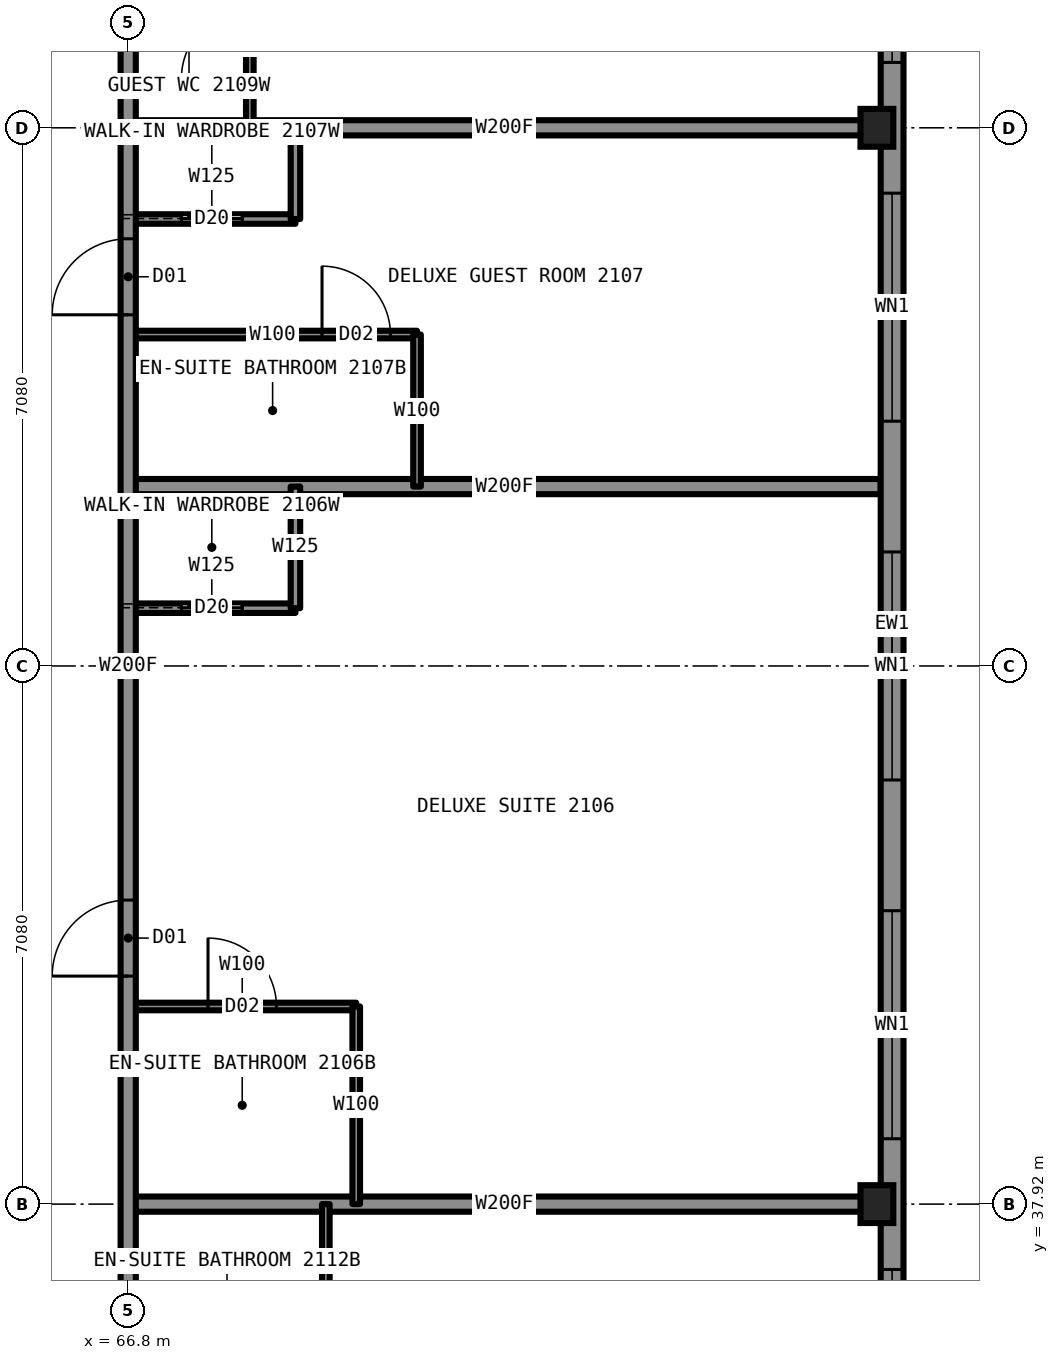
"""IFC4 building model, lengths in metres.
Left out: names, types, materials, properties, quantities, classifications, styles, units other than length and angle.
Written with IfcOpenShell. Run it as: python <this file> out.ifc"""

import sys

from ifc_helpers import new_model, si_unit, direction, frame, frame_2d, origin, origin_2d, place, context, subcontext, project, spatial, rectangle, i_section, extrude, element, fill, save


model = new_model("IFC4")
c1 = context("Model", 3, precision=1e-05, world=origin(), true_north=direction((0.0, 1.0)))
c2 = subcontext(c1, "Body", "Model", "MODEL_VIEW")
j1 = project(units=[si_unit("LENGTHUNIT", "METRE"), si_unit("PLANEANGLEUNIT", "RADIAN")], contexts=[c1])
p1 = place(None, origin())
s1 = spatial("IfcSite", under=j1, at=p1, CompositionType="ELEMENT")
p2 = place(p1, origin())
s2 = spatial("IfcBuilding", under=s1, at=p2, CompositionType="ELEMENT")
p3 = place(p2, frame((0.0, 0.0, 81.0)))
s3 = spatial("IfcBuildingStorey", under=s2, at=p3, CompositionType="ELEMENT", Elevation=81.0)
for number, where, z_axis, x_axis in (
    (1, (76.65, 37.92, 0.0), (0.0, 0.0, 1.0), (1.0, 0.0, 0.0)),
    (2, (76.65, 52.08, 0.0), (0.0, 0.0, 1.0), (1.0, 0.0, 0.0)),
):
    element("IfcColumn", number, at=place(p3, frame(where, z_axis=z_axis, x_axis=x_axis)), inside=s3, PredefinedType="COLUMN", context=c2, shape_type="SweptSolid", body=[
        extrude(i_section(OverallWidth=0.432, OverallDepth=0.498, WebThickness=0.056, FlangeThickness=0.089, at=origin_2d()), origin(), (0.0, 0.0, 1.0), 3.5),
    ])
p4 = place(p3, frame((66.8, 40.52, 0.0), z_axis=(0.0, 0.0, 1.0), x_axis=(1.0, 0.0, 0.0)))
e3 = element("IfcWall", 3, at=p4, inside=s3, PredefinedType="PARTITIONING", context=c2, shape_type="SweptSolid", body=[
    extrude(rectangle(XDim=3.0, YDim=0.1, at=frame_2d((1.5, 0.0))), origin(), (0.0, 0.0, 1.0), 3.33),
])
p5 = place(p4, frame((1.05, 0.0, 0.0)))
e4 = element("IfcOpeningElement", 4, at=p5, cuts=e3, PredefinedType="OPENING", context=c2, shape_type="SweptSolid", body=[
    extrude(rectangle(XDim=0.9, YDim=2.1, at=frame_2d((0.45, 1.05))), frame((0.0, 0.06, 0.0), z_axis=(0.0, -1.0, 0.0), x_axis=(1.0, 0.0, 0.0)), (0.0, 0.0, 1.0), 0.12),
])
p6 = place(p3, frame((66.8, 37.92, 0.0), z_axis=(0.0, 0.0, 1.0), x_axis=(1.0, 0.0, 0.0)))
e5 = element("IfcWall", 5, at=p6, inside=s3, PredefinedType="PARTITIONING", context=c2, shape_type="SweptSolid", body=[
    extrude(rectangle(XDim=9.9, YDim=0.2, at=frame_2d((4.95, 0.0))), origin(), (0.0, 0.0, 1.0), 2.573),
])
p7 = place(p3, frame((66.8, 45.76, 0.0), z_axis=(0.0, 0.0, 1.0), x_axis=(1.0, 0.0, 0.0)))
e6 = element("IfcWall", 6, at=p7, inside=s3, PredefinedType="PARTITIONING", context=c2, shape_type="SweptSolid", body=[
    extrude(rectangle(XDim=2.2, YDim=0.125, at=frame_2d((1.1, 0.0))), origin(), (0.0, 0.0, 1.0), 3.33),
])
p8 = place(p7, frame((0.7, 0.0, 0.0)))
e7 = element("IfcOpeningElement", 7, at=p8, cuts=e6, PredefinedType="OPENING", context=c2, shape_type="SweptSolid", body=[
    extrude(rectangle(XDim=0.8, YDim=2.1, at=frame_2d((0.4, 1.05))), frame((0.0, 0.073, 0.0), z_axis=(0.0, -1.0, 0.0), x_axis=(1.0, 0.0, 0.0)), (0.0, 0.0, 1.0), 0.145),
])
p9 = place(p3, frame((66.8, 47.36, 0.0), z_axis=(0.0, 0.0, 1.0), x_axis=(1.0, 0.0, 0.0)))
e8 = element("IfcWall", 8, at=p9, inside=s3, PredefinedType="PARTITIONING", context=c2, shape_type="SweptSolid", body=[
    extrude(rectangle(XDim=9.9, YDim=0.2, at=frame_2d((4.95, 0.0))), origin(), (0.0, 0.0, 1.0), 2.723),
])
p10 = place(p3, frame((66.8, 49.36, 0.0), z_axis=(0.0, 0.0, 1.0), x_axis=(1.0, 0.0, 0.0)))
e9 = element("IfcWall", 9, at=p10, inside=s3, PredefinedType="PARTITIONING", context=c2, shape_type="SweptSolid", body=[
    extrude(rectangle(XDim=3.8, YDim=0.1, at=frame_2d((1.9, 0.0))), origin(), (0.0, 0.0, 1.0), 3.33),
])
p11 = place(p10, frame((2.55, 0.0, 0.0)))
e10 = element("IfcOpeningElement", 10, at=p11, cuts=e9, PredefinedType="OPENING", context=c2, shape_type="SweptSolid", body=[
    extrude(rectangle(XDim=0.9, YDim=2.1, at=frame_2d((0.45, 1.05))), frame((0.0, 0.06, 0.0), z_axis=(0.0, -1.0, 0.0), x_axis=(1.0, 0.0, 0.0)), (0.0, 0.0, 1.0), 0.12),
])
p12 = place(p3, frame((66.8, 50.88, 0.0), z_axis=(0.0, 0.0, 1.0), x_axis=(1.0, 0.0, 0.0)))
e11 = element("IfcWall", 11, at=p12, inside=s3, PredefinedType="PARTITIONING", context=c2, shape_type="SweptSolid", body=[
    extrude(rectangle(XDim=2.2, YDim=0.125, at=frame_2d((1.1, 0.0))), origin(), (0.0, 0.0, 1.0), 3.33),
])
p13 = place(p12, frame((0.7, 0.0, 0.0)))
e12 = element("IfcOpeningElement", 12, at=p13, cuts=e11, PredefinedType="OPENING", context=c2, shape_type="SweptSolid", body=[
    extrude(rectangle(XDim=0.8, YDim=2.1, at=frame_2d((0.4, 1.05))), frame((0.0, 0.073, 0.0), z_axis=(0.0, -1.0, 0.0), x_axis=(1.0, 0.0, 0.0)), (0.0, 0.0, 1.0), 0.145),
])
p14 = place(p3, frame((66.8, 52.08, 0.0), z_axis=(0.0, 0.0, 1.0), x_axis=(1.0, 0.0, 0.0)))
e13 = element("IfcWall", 13, at=p14, inside=s3, PredefinedType="PARTITIONING", context=c2, shape_type="SweptSolid", body=[
    extrude(rectangle(XDim=9.9, YDim=0.2, at=frame_2d((4.95, 0.0))), origin(), (0.0, 0.0, 1.0), 2.573),
])
p15 = place(p3, frame((66.8, 33.2, 0.0), z_axis=(0.0, 0.0, 1.0), x_axis=(0.0, 1.0, 0.0)))
e14 = element("IfcWall", 14, at=p15, inside=s3, PredefinedType="PARTITIONING", context=c2, shape_type="SweptSolid", body=[
    extrude(rectangle(XDim=23.6, YDim=0.2, at=frame_2d((11.8, 0.0))), origin(), (0.0, 0.0, 1.0), 3.33),
])
p16 = place(p15, frame((7.72, 0.0, 0.0)))
e15 = element("IfcOpeningElement", 15, at=p16, cuts=e14, PredefinedType="OPENING", context=c2, shape_type="SweptSolid", body=[
    extrude(rectangle(XDim=1.0, YDim=2.2, at=frame_2d((0.5, 1.1))), frame((0.0, 0.11, 0.0), z_axis=(0.0, -1.0, 0.0), x_axis=(1.0, 0.0, 0.0)), (0.0, 0.0, 1.0), 0.22),
])
p17 = place(p15, frame((16.42, 0.0, 0.0)))
e16 = element("IfcOpeningElement", 16, at=p17, cuts=e14, PredefinedType="OPENING", context=c2, shape_type="SweptSolid", body=[
    extrude(rectangle(XDim=1.0, YDim=2.2, at=frame_2d((0.5, 1.1))), frame((0.0, 0.11, 0.0), z_axis=(0.0, -1.0, 0.0), x_axis=(1.0, 0.0, 0.0)), (0.0, 0.0, 1.0), 0.22),
])
p18 = place(p15, frame((21.85, 0.0, 0.0)))
e17 = element("IfcOpeningElement", 17, at=p18, cuts=e14, PredefinedType="OPENING", context=c2, shape_type="SweptSolid", body=[
    extrude(rectangle(XDim=1.1, YDim=2.2, at=frame_2d((0.55, 1.1))), frame((0.0, 0.11, 0.0), z_axis=(0.0, -1.0, 0.0), x_axis=(1.0, 0.0, 0.0)), (0.0, 0.0, 1.0), 0.22),
])
p19 = place(p15, frame((0.66, 0.0, 0.0)))
e18 = element("IfcOpeningElement", 18, at=p19, cuts=e14, PredefinedType="OPENING", context=c2, shape_type="SweptSolid", body=[
    extrude(rectangle(XDim=1.1, YDim=2.2, at=frame_2d((0.55, 1.1))), frame((0.0, 0.11, 0.0), z_axis=(0.0, -1.0, 0.0), x_axis=(1.0, 0.0, 0.0)), (0.0, 0.0, 1.0), 0.22),
])
p20 = place(p3, frame((68.4, 52.08, 0.0), z_axis=(0.0, 0.0, 1.0), x_axis=(0.0, 1.0, 0.0)))
e19 = element("IfcWall", 19, at=p20, inside=s3, PredefinedType="PARTITIONING", context=c2, shape_type="SweptSolid", body=[
    extrude(rectangle(XDim=2.2, YDim=0.1, at=frame_2d((1.1, 0.0))), origin(), (0.0, 0.0, 1.0), 3.33),
])
p21 = place(p20, frame((0.65, 0.0, 0.0)))
e20 = element("IfcOpeningElement", 20, at=p21, cuts=e19, PredefinedType="OPENING", context=c2, shape_type="SweptSolid", body=[
    extrude(rectangle(XDim=0.9, YDim=2.1, at=frame_2d((0.45, 1.05))), frame((0.0, 0.06, 0.0), z_axis=(0.0, -1.0, 0.0), x_axis=(1.0, 0.0, 0.0)), (0.0, 0.0, 1.0), 0.12),
])
p22 = place(p3, frame((69.0, 45.76, 0.0), z_axis=(0.0, 0.0, 1.0), x_axis=(0.0, 1.0, 0.0)))
e21 = element("IfcWall", 21, at=p22, inside=s3, PredefinedType="PARTITIONING", context=c2, shape_type="SweptSolid", body=[
    extrude(rectangle(XDim=1.6, YDim=0.125, at=frame_2d((0.8, 0.0))), origin(), (0.0, 0.0, 1.0), 3.33),
])
p23 = place(p3, frame((69.0, 50.88, 0.0), z_axis=(0.0, 0.0, 1.0), x_axis=(0.0, 1.0, 0.0)))
e22 = element("IfcWall", 22, at=p23, inside=s3, PredefinedType="PARTITIONING", context=c2, shape_type="SweptSolid", body=[
    extrude(rectangle(XDim=1.2, YDim=0.125, at=frame_2d((0.6, 0.0))), origin(), (0.0, 0.0, 1.0), 3.33),
])
p24 = place(p3, frame((69.4, 35.32, 0.0), z_axis=(0.0, 0.0, 1.0), x_axis=(0.0, 1.0, 0.0)))
e23 = element("IfcWall", 23, at=p24, inside=s3, PredefinedType="PARTITIONING", context=c2, shape_type="SweptSolid", body=[
    extrude(rectangle(XDim=2.6, YDim=0.1, at=frame_2d((1.3, 0.0))), origin(), (0.0, 0.0, 1.0), 3.33),
])
p25 = place(p3, frame((69.8, 37.92, 0.0), z_axis=(0.0, 0.0, 1.0), x_axis=(0.0, 1.0, 0.0)))
e24 = element("IfcWall", 24, at=p25, inside=s3, PredefinedType="PARTITIONING", context=c2, shape_type="SweptSolid", body=[
    extrude(rectangle(XDim=2.6, YDim=0.1, at=frame_2d((1.3, 0.0))), origin(), (0.0, 0.0, 1.0), 3.33),
])
p26 = place(p3, frame((70.6, 47.36, 0.0), z_axis=(0.0, 0.0, 1.0), x_axis=(0.0, 1.0, 0.0)))
e25 = element("IfcWall", 25, at=p26, inside=s3, PredefinedType="PARTITIONING", context=c2, shape_type="SweptSolid", body=[
    extrude(rectangle(XDim=2.0, YDim=0.1, at=frame_2d((1.0, 0.0))), origin(), (0.0, 0.0, 1.0), 3.33),
])
p27 = place(p3, frame((76.85, 28.5, 0.0), z_axis=(0.0, 0.0, 1.0), x_axis=(0.0, 1.0, 0.0)))
e26 = element("IfcWall", 26, at=p27, inside=s3, PredefinedType="SOLIDWALL", context=c2, shape_type="SweptSolid", body=[
    extrude(rectangle(XDim=33.0, YDim=0.3, at=frame_2d((16.5, 0.0))), origin(), (0.0, 0.0, 1.0), 2.63),
])
p28 = place(p27, frame((0.85, 0.0, 0.5)))
e27 = element("IfcOpeningElement", 27, at=p28, cuts=e26, PredefinedType="OPENING", context=c2, shape_type="SweptSolid", body=[
    extrude(rectangle(XDim=3.0, YDim=2.0, at=frame_2d((1.5, 1.0))), frame((0.0, 0.16, 0.0), z_axis=(0.0, -1.0, 0.0), x_axis=(1.0, 0.0, 0.0)), (0.0, 0.0, 1.0), 0.32),
])
p29 = place(p27, frame((5.56, 0.0, 0.5)))
e28 = element("IfcOpeningElement", 28, at=p29, cuts=e26, PredefinedType="OPENING", context=c2, shape_type="SweptSolid", body=[
    extrude(rectangle(XDim=3.0, YDim=2.0, at=frame_2d((1.5, 1.0))), frame((0.0, 0.16, 0.0), z_axis=(0.0, -1.0, 0.0), x_axis=(1.0, 0.0, 0.0)), (0.0, 0.0, 1.0), 0.32),
])
p30 = place(p27, frame((10.28, 0.0, 0.5)))
e29 = element("IfcOpeningElement", 29, at=p30, cuts=e26, PredefinedType="OPENING", context=c2, shape_type="SweptSolid", body=[
    extrude(rectangle(XDim=3.0, YDim=2.0, at=frame_2d((1.5, 1.0))), frame((0.0, 0.16, 0.0), z_axis=(0.0, -1.0, 0.0), x_axis=(1.0, 0.0, 0.0)), (0.0, 0.0, 1.0), 0.32),
])
p31 = place(p27, frame((15.0, 0.0, 0.5)))
e30 = element("IfcOpeningElement", 30, at=p31, cuts=e26, PredefinedType="OPENING", context=c2, shape_type="SweptSolid", body=[
    extrude(rectangle(XDim=3.0, YDim=2.0, at=frame_2d((1.5, 1.0))), frame((0.0, 0.16, 0.0), z_axis=(0.0, -1.0, 0.0), x_axis=(1.0, 0.0, 0.0)), (0.0, 0.0, 1.0), 0.32),
])
p32 = place(p27, frame((19.72, 0.0, 0.5)))
e31 = element("IfcOpeningElement", 31, at=p32, cuts=e26, PredefinedType="OPENING", context=c2, shape_type="SweptSolid", body=[
    extrude(rectangle(XDim=3.0, YDim=2.0, at=frame_2d((1.5, 1.0))), frame((0.0, 0.16, 0.0), z_axis=(0.0, -1.0, 0.0), x_axis=(1.0, 0.0, 0.0)), (0.0, 0.0, 1.0), 0.32),
])
p33 = place(p27, frame((24.44, 0.0, 0.5)))
e32 = element("IfcOpeningElement", 32, at=p33, cuts=e26, PredefinedType="OPENING", context=c2, shape_type="SweptSolid", body=[
    extrude(rectangle(XDim=3.0, YDim=2.0, at=frame_2d((1.5, 1.0))), frame((0.0, 0.16, 0.0), z_axis=(0.0, -1.0, 0.0), x_axis=(1.0, 0.0, 0.0)), (0.0, 0.0, 1.0), 0.32),
])
p34 = place(p27, frame((29.15, 0.0, 0.5)))
e33 = element("IfcOpeningElement", 33, at=p34, cuts=e26, PredefinedType="OPENING", context=c2, shape_type="SweptSolid", body=[
    extrude(rectangle(XDim=3.0, YDim=2.0, at=frame_2d((1.5, 1.0))), frame((0.0, 0.16, 0.0), z_axis=(0.0, -1.0, 0.0), x_axis=(1.0, 0.0, 0.0)), (0.0, 0.0, 1.0), 0.32),
])
p35 = place(p16, origin())
e34 = element("IfcDoor", 34, at=p35, inside=s3, OperationType="SINGLE_SWING_LEFT", PredefinedType="DOOR", context=c2, shape_type="SweptSolid", body=[
    extrude(rectangle(XDim=1.0, YDim=2.2, at=frame_2d((0.5, 1.1))), frame((0.0, 0.025, 0.0), z_axis=(0.0, -1.0, 0.0), x_axis=(1.0, 0.0, 0.0)), (0.0, 0.0, 1.0), 0.05),
])
fill(e15, e34)
p36 = place(p5, origin())
e35 = element("IfcDoor", 35, at=p36, inside=s3, OperationType="SINGLE_SWING_RIGHT", PredefinedType="DOOR", context=c2, shape_type="SweptSolid", body=[
    extrude(rectangle(XDim=0.9, YDim=2.1, at=frame_2d((0.45, 1.05))), frame((0.0, 0.025, 0.0), z_axis=(0.0, -1.0, 0.0), x_axis=(1.0, 0.0, 0.0)), (0.0, 0.0, 1.0), 0.05),
])
fill(e4, e35)
p37 = place(p8, origin())
e36 = element("IfcDoor", 36, at=p37, inside=s3, OperationType="SLIDING_TO_LEFT", PredefinedType="DOOR", context=c2, shape_type="SweptSolid", body=[
    extrude(rectangle(XDim=0.8, YDim=2.1, at=frame_2d((0.4, 1.05))), frame((0.0, 0.025, 0.0), z_axis=(0.0, -1.0, 0.0), x_axis=(1.0, 0.0, 0.0)), (0.0, 0.0, 1.0), 0.05),
])
fill(e7, e36)
p38 = place(p17, origin())
e37 = element("IfcDoor", 37, at=p38, inside=s3, OperationType="SINGLE_SWING_LEFT", PredefinedType="DOOR", context=c2, shape_type="SweptSolid", body=[
    extrude(rectangle(XDim=1.0, YDim=2.2, at=frame_2d((0.5, 1.1))), frame((0.0, 0.025, 0.0), z_axis=(0.0, -1.0, 0.0), x_axis=(1.0, 0.0, 0.0)), (0.0, 0.0, 1.0), 0.05),
])
fill(e16, e37)
p39 = place(p11, origin())
e38 = element("IfcDoor", 38, at=p39, inside=s3, OperationType="SINGLE_SWING_RIGHT", PredefinedType="DOOR", context=c2, shape_type="SweptSolid", body=[
    extrude(rectangle(XDim=0.9, YDim=2.1, at=frame_2d((0.45, 1.05))), frame((0.0, 0.025, 0.0), z_axis=(0.0, -1.0, 0.0), x_axis=(1.0, 0.0, 0.0)), (0.0, 0.0, 1.0), 0.05),
])
fill(e10, e38)
p40 = place(p13, origin())
e39 = element("IfcDoor", 39, at=p40, inside=s3, OperationType="SLIDING_TO_LEFT", PredefinedType="DOOR", context=c2, shape_type="SweptSolid", body=[
    extrude(rectangle(XDim=0.8, YDim=2.1, at=frame_2d((0.4, 1.05))), frame((0.0, 0.025, 0.0), z_axis=(0.0, -1.0, 0.0), x_axis=(1.0, 0.0, 0.0)), (0.0, 0.0, 1.0), 0.05),
])
fill(e12, e39)
p41 = place(p21, origin())
e40 = element("IfcDoor", 40, at=p41, inside=s3, OperationType="SINGLE_SWING_LEFT", PredefinedType="DOOR", context=c2, shape_type="SweptSolid", body=[
    extrude(rectangle(XDim=0.9, YDim=2.1, at=frame_2d((0.45, 1.05))), frame((0.0, 0.025, 0.0), z_axis=(0.0, -1.0, 0.0), x_axis=(1.0, 0.0, 0.0)), (0.0, 0.0, 1.0), 0.05),
])
fill(e20, e40)
p42 = place(p29, origin())
e41 = element("IfcWindow", 41, at=p42, inside=s3, PartitioningType="SINGLE_PANEL", PredefinedType="WINDOW", context=c2, shape_type="SweptSolid", body=[
    extrude(rectangle(XDim=3.0, YDim=2.0, at=frame_2d((1.5, 1.0))), frame((0.0, 0.03, 0.0), z_axis=(0.0, -1.0, 0.0), x_axis=(1.0, 0.0, 0.0)), (0.0, 0.0, 1.0), 0.06),
])
fill(e28, e41)
p43 = place(p30, origin())
e42 = element("IfcWindow", 42, at=p43, inside=s3, PartitioningType="SINGLE_PANEL", PredefinedType="WINDOW", context=c2, shape_type="SweptSolid", body=[
    extrude(rectangle(XDim=3.0, YDim=2.0, at=frame_2d((1.5, 1.0))), frame((0.0, 0.03, 0.0), z_axis=(0.0, -1.0, 0.0), x_axis=(1.0, 0.0, 0.0)), (0.0, 0.0, 1.0), 0.06),
])
fill(e29, e42)
p44 = place(p31, origin())
e43 = element("IfcWindow", 43, at=p44, inside=s3, PartitioningType="SINGLE_PANEL", PredefinedType="WINDOW", context=c2, shape_type="SweptSolid", body=[
    extrude(rectangle(XDim=3.0, YDim=2.0, at=frame_2d((1.5, 1.0))), frame((0.0, 0.03, 0.0), z_axis=(0.0, -1.0, 0.0), x_axis=(1.0, 0.0, 0.0)), (0.0, 0.0, 1.0), 0.06),
])
fill(e30, e43)
p45 = place(p32, origin())
e44 = element("IfcWindow", 44, at=p45, inside=s3, PartitioningType="SINGLE_PANEL", PredefinedType="WINDOW", context=c2, shape_type="SweptSolid", body=[
    extrude(rectangle(XDim=3.0, YDim=2.0, at=frame_2d((1.5, 1.0))), frame((0.0, 0.03, 0.0), z_axis=(0.0, -1.0, 0.0), x_axis=(1.0, 0.0, 0.0)), (0.0, 0.0, 1.0), 0.06),
])
fill(e31, e44)
p46 = place(p33, origin())
e45 = element("IfcWindow", 45, at=p46, inside=s3, PartitioningType="SINGLE_PANEL", PredefinedType="WINDOW", context=c2, shape_type="SweptSolid", body=[
    extrude(rectangle(XDim=3.0, YDim=2.0, at=frame_2d((1.5, 1.0))), frame((0.0, 0.03, 0.0), z_axis=(0.0, -1.0, 0.0), x_axis=(1.0, 0.0, 0.0)), (0.0, 0.0, 1.0), 0.06),
])
fill(e32, e45)
save(model, sys.argv[1])
